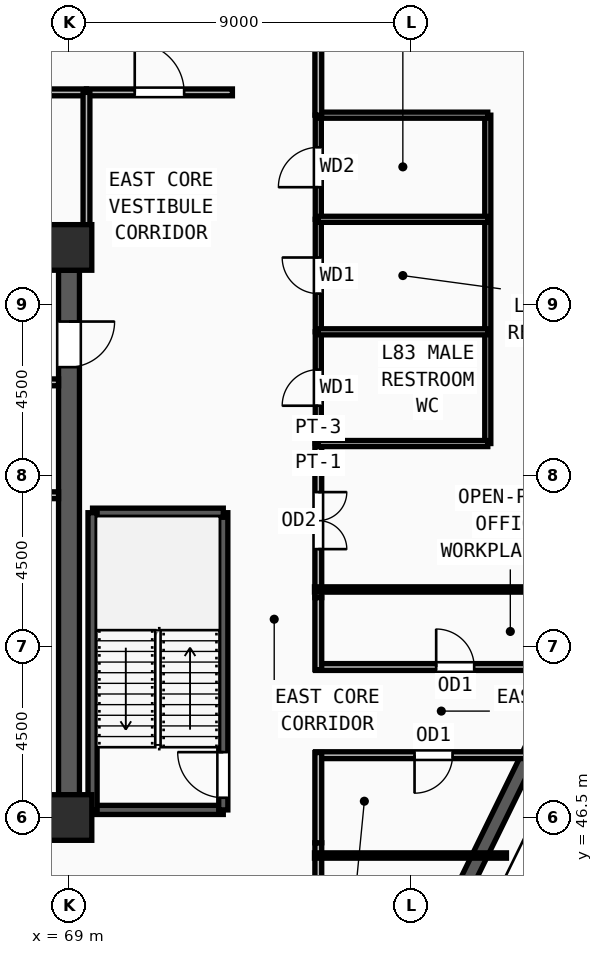
"""IFC4 building model, lengths in metres.
Left out: names, types, materials, properties, quantities, classifications, styles, units other than length and angle.
Written with IfcOpenShell. Run it as: python <this file> out.ifc"""

import sys

from ifc_helpers import new_model, si_unit, direction, frame, frame_2d, origin, origin_2d, place, context, subcontext, project, spatial, rectangle, extrude, source, transform, mapped, element, fill, save


model = new_model("IFC4")
c1 = context("Model", 3, precision=1e-05, world=origin(), true_north=direction((0.0, 1.0)))
c2 = subcontext(c1, "Body", "Model", "MODEL_VIEW")
j1 = project(units=[si_unit("LENGTHUNIT", "METRE"), si_unit("PLANEANGLEUNIT", "RADIAN")], contexts=[c1])
p1 = place(None, origin())
s1 = spatial("IfcSite", under=j1, at=p1, CompositionType="ELEMENT")
p2 = place(p1, origin())
s2 = spatial("IfcBuilding", under=s1, at=p2, CompositionType="ELEMENT")
p3 = place(p2, frame((0.0, 0.0, 320.25)))
s3 = spatial("IfcBuildingStorey", under=s2, at=p3, CompositionType="ELEMENT", Elevation=320.25)
m1 = source(origin(), c2, "Body", "SweptSolid", [
    extrude(rectangle(XDim=1.2, YDim=1.2, at=origin_2d()), origin(), (0.0, 0.0, 1.0), 3.75),
])
for number, where, z_axis, x_axis in (
    (1, (69.0, 46.5, 0.0), (0.0, 0.0, 1.0), (1.0, 0.0, 0.0)),
    (2, (69.0, 61.5, 0.0), (0.0, 0.0, 1.0), (1.0, 0.0, 0.0)),
):
    element("IfcColumn", number, at=place(p3, frame(where, z_axis=z_axis, x_axis=x_axis)), inside=s3, PredefinedType="COLUMN", context=c2, shape_type="MappedRepresentation", body=[
        mapped(m1, transform((0.0, 0.0, 0.0), x_axis=(1.0, 0.0, 0.0), y_axis=(0.0, 1.0, 0.0), z_axis=(0.0, 0.0, 1.0), scale=1.0)),
    ])
p4 = place(p3, frame((77.918, 41.639, 0.0), z_axis=(0.0, 0.0, 1.0), x_axis=(0.440053301327, 0.897971654336, 0.0)))
e3 = element("IfcWall", 3, at=p4, inside=s3, PredefinedType="SOLIDWALL", context=c2, shape_type="SweptSolid", body=[
    extrude(rectangle(XDim=26.074, YDim=0.38, at=frame_2d((13.037, 0.0))), origin(), (0.0, 0.0, 1.0), 3.47),
])
m2 = source(origin(), c2, "Body", "SweptSolid", [
    extrude(rectangle(XDim=1.35, YDim=1.85, at=frame_2d((0.675, 0.925))), frame((0.0, 0.2, 0.0), z_axis=(0.0, -1.0, 0.0), x_axis=(1.0, 0.0, 0.0)), (0.0, 0.0, 1.0), 0.4),
])
p5 = place(p4, frame((13.212, 0.0, 0.55)))
e4 = element("IfcOpeningElement", 4, at=p5, cuts=e3, PredefinedType="OPENING", context=c2, shape_type="MappedRepresentation", body=[
    mapped(m2, transform((0.0, 0.0, 0.0), x_axis=(1.0, 0.0, 0.0), y_axis=(0.0, 1.0, 0.0), z_axis=(0.0, 0.0, 1.0), scale=1.0)),
])
p6 = place(p4, frame((18.881, 0.0, 0.55)))
e5 = element("IfcOpeningElement", 5, at=p6, cuts=e3, PredefinedType="OPENING", context=c2, shape_type="MappedRepresentation", body=[
    mapped(m2, transform((0.0, 0.0, 0.0), x_axis=(1.0, 0.0, 0.0), y_axis=(0.0, 1.0, 0.0), z_axis=(0.0, 0.0, 1.0), scale=1.0)),
])
p7 = place(p3, frame((69.0, 60.9, 0.0), z_axis=(0.0, 0.0, 1.0), x_axis=(0.0, -1.0, 0.0)))
e6 = element("IfcWall", 6, at=p7, inside=s3, PredefinedType="SHEAR", context=c2, shape_type="SweptSolid", body=[
    extrude(rectangle(XDim=13.8, YDim=0.55, at=frame_2d((6.9, 0.0))), origin(), (0.0, 0.0, 1.0), 3.47),
])
m3 = source(origin(), c2, "Body", "SweptSolid", [
    extrude(rectangle(XDim=1.2, YDim=2.2, at=frame_2d((0.6, 1.1))), frame((0.0, 0.285, 0.0), z_axis=(0.0, -1.0, 0.0), x_axis=(1.0, 0.0, 0.0)), (0.0, 0.0, 1.0), 0.57),
])
p8 = place(p7, frame((1.35, 0.0, 0.0)))
e7 = element("IfcOpeningElement", 7, at=p8, cuts=e6, PredefinedType="OPENING", context=c2, shape_type="MappedRepresentation", body=[
    mapped(m3, transform((0.0, 0.0, 0.0), x_axis=(1.0, 0.0, 0.0), y_axis=(0.0, 1.0, 0.0), z_axis=(0.0, 0.0, 1.0), scale=1.0)),
])
p9 = place(p3, frame((69.62, 46.7, 0.0), z_axis=(0.0, 0.0, 1.0), x_axis=(1.0, 0.0, 0.0)))
e8 = element("IfcWall", 8, at=p9, inside=s3, PredefinedType="SOLIDWALL", context=c2, shape_type="SweptSolid", body=[
    extrude(rectangle(XDim=3.44, YDim=0.24, at=frame_2d((1.72, 0.0))), origin(), (0.0, 0.0, 1.0), 3.47),
])
p10 = place(p3, frame((73.06, 46.7, 0.0), z_axis=(0.0, 0.0, 1.0), x_axis=(0.0, 1.0, 0.0)))
e9 = element("IfcWall", 9, at=p10, inside=s3, PredefinedType="SOLIDWALL", context=c2, shape_type="SweptSolid", body=[
    extrude(rectangle(XDim=7.82, YDim=0.24, at=frame_2d((3.91, 0.0))), origin(), (0.0, 0.0, 1.0), 3.47),
])
m4 = source(origin(), c2, "Body", "SweptSolid", [
    extrude(rectangle(XDim=1.2, YDim=2.2, at=frame_2d((0.6, 1.1))), frame((0.0, 0.13, 0.0), z_axis=(0.0, -1.0, 0.0), x_axis=(1.0, 0.0, 0.0)), (0.0, 0.0, 1.0), 0.26),
])
p11 = place(p10, frame((0.32, 0.0, 0.0)))
e10 = element("IfcOpeningElement", 10, at=p11, cuts=e9, PredefinedType="OPENING", context=c2, shape_type="MappedRepresentation", body=[
    mapped(m4, transform((0.0, 0.0, 0.0), x_axis=(1.0, 0.0, 0.0), y_axis=(0.0, 1.0, 0.0), z_axis=(0.0, 0.0, 1.0), scale=1.0)),
])
p12 = place(p3, frame((73.06, 54.52, 0.0), z_axis=(0.0, 0.0, 1.0), x_axis=(-1.0, 0.0, 0.0)))
e11 = element("IfcWall", 11, at=p12, inside=s3, PredefinedType="SOLIDWALL", context=c2, shape_type="SweptSolid", body=[
    extrude(rectangle(XDim=3.44, YDim=0.24, at=frame_2d((1.72, 0.0))), origin(), (0.0, 0.0, 1.0), 3.47),
])
p13 = place(p3, frame((69.62, 54.52, 0.0), z_axis=(0.0, 0.0, 1.0), x_axis=(0.0, -1.0, 0.0)))
e12 = element("IfcWall", 12, at=p13, inside=s3, PredefinedType="SOLIDWALL", context=c2, shape_type="SweptSolid", body=[
    extrude(rectangle(XDim=7.82, YDim=0.24, at=frame_2d((3.91, 0.0))), origin(), (0.0, 0.0, 1.0), 3.47),
])
p14 = place(p3, frame((62.1, 54.98, 0.0), z_axis=(0.0, 0.0, 1.0), x_axis=(1.0, 0.0, 0.0)))
e13 = element("IfcWall", 13, at=p14, inside=s3, PredefinedType="PARTITIONING", context=c2, shape_type="SweptSolid", body=[
    extrude(rectangle(XDim=6.625, YDim=0.18, at=frame_2d((3.312, 0.0))), origin(), (0.0, 0.0, 1.0), 3.47),
])
m5 = source(origin(), c2, "Body", "SweptSolid", [
    extrude(rectangle(XDim=0.85, YDim=2.1, at=frame_2d((0.425, 1.05))), frame((0.0, 0.1, 0.0), z_axis=(0.0, -1.0, 0.0), x_axis=(1.0, 0.0, 0.0)), (0.0, 0.0, 1.0), 0.2),
])
p15 = place(p14, frame((2.8, 0.0, 0.0)))
e14 = element("IfcOpeningElement", 14, at=p15, cuts=e13, PredefinedType="OPENING", context=c2, shape_type="MappedRepresentation", body=[
    mapped(m5, transform((0.0, 0.0, 0.0), x_axis=(1.0, 0.0, 0.0), y_axis=(0.0, 1.0, 0.0), z_axis=(0.0, 0.0, 1.0), scale=1.0)),
])
p16 = place(p3, frame((75.56, 56.34, 0.0), z_axis=(0.0, 0.0, 1.0), x_axis=(0.0, 1.0, 0.0)))
e15 = element("IfcWall", 15, at=p16, inside=s3, PredefinedType="PARTITIONING", context=c2, shape_type="SweptSolid", body=[
    extrude(rectangle(XDim=2.94, YDim=0.16, at=frame_2d((1.47, 0.0))), origin(), (0.0, 0.0, 1.0), 3.47),
])
m6 = source(origin(), c2, "Body", "SweptSolid", [
    extrude(rectangle(XDim=0.95, YDim=2.15, at=frame_2d((0.475, 1.075))), frame((0.0, 0.09, 0.0), z_axis=(0.0, -1.0, 0.0), x_axis=(1.0, 0.0, 0.0)), (0.0, 0.0, 1.0), 0.18),
])
p17 = place(p16, frame((0.995, 0.0, 0.0)))
e16 = element("IfcOpeningElement", 16, at=p17, cuts=e15, PredefinedType="OPENING", context=c2, shape_type="MappedRepresentation", body=[
    mapped(m6, transform((0.0, 0.0, 0.0), x_axis=(1.0, 0.0, 0.0), y_axis=(0.0, 1.0, 0.0), z_axis=(0.0, 0.0, 1.0), scale=1.0)),
])
p18 = place(p3, frame((75.56, 59.28, 0.0), z_axis=(0.0, 0.0, 1.0), x_axis=(0.0, 1.0, 0.0)))
e17 = element("IfcWall", 17, at=p18, inside=s3, PredefinedType="PARTITIONING", context=c2, shape_type="SweptSolid", body=[
    extrude(rectangle(XDim=2.96, YDim=0.16, at=frame_2d((1.48, 0.0))), origin(), (0.0, 0.0, 1.0), 3.47),
])
p19 = place(p18, frame((1.005, 0.0, 0.0)))
e18 = element("IfcOpeningElement", 18, at=p19, cuts=e17, PredefinedType="OPENING", context=c2, shape_type="MappedRepresentation", body=[
    mapped(m6, transform((0.0, 0.0, 0.0), x_axis=(1.0, 0.0, 0.0), y_axis=(0.0, 1.0, 0.0), z_axis=(0.0, 0.0, 1.0), scale=1.0)),
])
p20 = place(p3, frame((75.56, 62.24, 0.0), z_axis=(0.0, 0.0, 1.0), x_axis=(0.0, 1.0, 0.0)))
e19 = element("IfcWall", 19, at=p20, inside=s3, PredefinedType="PARTITIONING", context=c2, shape_type="SweptSolid", body=[
    extrude(rectangle(XDim=2.74, YDim=0.16, at=frame_2d((1.37, 0.0))), origin(), (0.0, 0.0, 1.0), 3.47),
])
m7 = source(origin(), c2, "Body", "SweptSolid", [
    extrude(rectangle(XDim=1.05, YDim=2.15, at=frame_2d((0.525, 1.075))), frame((0.0, 0.09, 0.0), z_axis=(0.0, -1.0, 0.0), x_axis=(1.0, 0.0, 0.0)), (0.0, 0.0, 1.0), 0.18),
])
p21 = place(p20, frame((0.845, 0.0, 0.0)))
e20 = element("IfcOpeningElement", 20, at=p21, cuts=e19, PredefinedType="OPENING", context=c2, shape_type="MappedRepresentation", body=[
    mapped(m7, transform((0.0, 0.0, 0.0), x_axis=(1.0, 0.0, 0.0), y_axis=(0.0, 1.0, 0.0), z_axis=(0.0, 0.0, 1.0), scale=1.0)),
])
p22 = place(p3, frame((62.39, 65.58, 0.0), z_axis=(0.0, 0.0, 1.0), x_axis=(1.0, 0.0, 0.0)))
e21 = element("IfcWall", 21, at=p22, inside=s3, PredefinedType="PARTITIONING", context=c2, shape_type="SweptSolid", body=[
    extrude(rectangle(XDim=7.07, YDim=0.18, at=frame_2d((3.535, 0.0))), origin(), (0.0, 0.0, 1.0), 3.47),
])
m8 = source(origin(), c2, "Body", "SweptSolid", [
    extrude(rectangle(XDim=1.0, YDim=2.2, at=frame_2d((0.5, 1.1))), frame((0.0, 0.1, 0.0), z_axis=(0.0, -1.0, 0.0), x_axis=(1.0, 0.0, 0.0)), (0.0, 0.0, 1.0), 0.2),
])
p23 = place(p22, frame((3.035, 0.0, 0.0)))
e22 = element("IfcOpeningElement", 22, at=p23, cuts=e21, PredefinedType="OPENING", context=c2, shape_type="MappedRepresentation", body=[
    mapped(m8, transform((0.0, 0.0, 0.0), x_axis=(1.0, 0.0, 0.0), y_axis=(0.0, 1.0, 0.0), z_axis=(0.0, 0.0, 1.0), scale=1.0)),
])
p24 = place(p3, frame((69.46, 65.58, 0.0), z_axis=(0.0, 0.0, 1.0), x_axis=(1.0, 0.0, 0.0)))
e23 = element("IfcWall", 23, at=p24, inside=s3, PredefinedType="PARTITIONING", context=c2, shape_type="SweptSolid", body=[
    extrude(rectangle(XDim=3.84, YDim=0.18, at=frame_2d((1.92, 0.0))), origin(), (0.0, 0.0, 1.0), 3.47),
])
m9 = source(origin(), c2, "Body", "SweptSolid", [
    extrude(rectangle(XDim=1.3, YDim=2.2, at=frame_2d((0.65, 1.1))), frame((0.0, 0.1, 0.0), z_axis=(0.0, -1.0, 0.0), x_axis=(1.0, 0.0, 0.0)), (0.0, 0.0, 1.0), 0.2),
])
p25 = place(p24, frame((1.27, 0.0, 0.0)))
e24 = element("IfcOpeningElement", 24, at=p25, cuts=e23, PredefinedType="OPENING", context=c2, shape_type="MappedRepresentation", body=[
    mapped(m9, transform((0.0, 0.0, 0.0), x_axis=(1.0, 0.0, 0.0), y_axis=(0.0, 1.0, 0.0), z_axis=(0.0, 0.0, 1.0), scale=1.0)),
])
p26 = place(p3, frame((75.56, 56.34, 0.0), z_axis=(0.0, 0.0, 1.0), x_axis=(0.0, -1.0, 0.0)))
e25 = element("IfcWall", 25, at=p26, inside=s3, PredefinedType="PARTITIONING", context=c2, shape_type="SweptSolid", body=[
    extrude(rectangle(XDim=4.055, YDim=0.18, at=frame_2d((2.028, 0.0))), origin(), (0.0, 0.0, 1.0), 3.47),
])
m10 = source(origin(), c2, "Body", "SweptSolid", [
    extrude(rectangle(XDim=1.5, YDim=2.2, at=frame_2d((0.75, 1.1))), frame((0.0, 0.1, 0.0), z_axis=(0.0, -1.0, 0.0), x_axis=(1.0, 0.0, 0.0)), (0.0, 0.0, 1.0), 0.2),
])
p27 = place(p26, frame((1.278, 0.0, 0.0)))
e26 = element("IfcOpeningElement", 26, at=p27, cuts=e25, PredefinedType="OPENING", context=c2, shape_type="MappedRepresentation", body=[
    mapped(m10, transform((0.0, 0.0, 0.0), x_axis=(1.0, 0.0, 0.0), y_axis=(0.0, 1.0, 0.0), z_axis=(0.0, 0.0, 1.0), scale=1.0)),
])
p28 = place(p3, frame((81.697, 48.14, 0.0), z_axis=(0.0, 0.0, 1.0), x_axis=(-1.0, 0.0, 0.0)))
e27 = element("IfcWall", 27, at=p28, inside=s3, PredefinedType="PARTITIONING", context=c2, shape_type="SweptSolid", body=[
    extrude(rectangle(XDim=6.207, YDim=0.18, at=frame_2d((3.104, 0.0))), origin(), (0.0, 0.0, 1.0), 3.47),
])
p29 = place(p28, frame((2.604, 0.0, 0.0)))
e28 = element("IfcOpeningElement", 28, at=p29, cuts=e27, PredefinedType="OPENING", context=c2, shape_type="MappedRepresentation", body=[
    mapped(m8, transform((0.0, 0.0, 0.0), x_axis=(1.0, 0.0, 0.0), y_axis=(0.0, 1.0, 0.0), z_axis=(0.0, 0.0, 1.0), scale=1.0)),
])
p30 = place(p3, frame((75.49, 50.46, 0.0), z_axis=(0.0, 0.0, 1.0), x_axis=(1.0, 0.0, 0.0)))
e29 = element("IfcWall", 29, at=p30, inside=s3, PredefinedType="PARTITIONING", context=c2, shape_type="SweptSolid", body=[
    extrude(rectangle(XDim=7.344, YDim=0.18, at=frame_2d((3.672, 0.0))), origin(), (0.0, 0.0, 1.0), 3.47),
])
p31 = place(p30, frame((3.172, 0.0, 0.0)))
e30 = element("IfcOpeningElement", 30, at=p31, cuts=e29, PredefinedType="OPENING", context=c2, shape_type="MappedRepresentation", body=[
    mapped(m8, transform((0.0, 0.0, 0.0), x_axis=(1.0, 0.0, 0.0), y_axis=(0.0, 1.0, 0.0), z_axis=(0.0, 0.0, 1.0), scale=1.0)),
])
p32 = place(p3, frame((80.02, 56.34, 0.0), z_axis=(0.0, 0.0, 1.0), x_axis=(0.0, 1.0, 0.0)))
e31 = element("IfcWall", 31, at=p32, inside=s3, PredefinedType="PARTITIONING", context=c2, shape_type="SweptSolid", body=[
    extrude(rectangle(XDim=8.64, YDim=0.16, at=frame_2d((4.32, 0.0))), origin(), (0.0, 0.0, 1.0), 3.47),
])
for number, where, z_axis, x_axis in (
    (32, (75.56, 56.34, 0.0), (0.0, 0.0, 1.0), (1.0, 0.0, 0.0)),
    (33, (75.56, 59.28, 0.0), (0.0, 0.0, 1.0), (1.0, 0.0, 0.0)),
    (34, (75.56, 62.24, 0.0), (0.0, 0.0, 1.0), (1.0, 0.0, 0.0)),
    (35, (75.56, 64.98, 0.0), (0.0, 0.0, 1.0), (1.0, 0.0, 0.0)),
):
    element("IfcWall", number, at=place(p3, frame(where, z_axis=z_axis, x_axis=x_axis)), inside=s3, PredefinedType="PARTITIONING", context=c2, shape_type="SweptSolid", body=[
        extrude(rectangle(XDim=4.46, YDim=0.16, at=frame_2d((2.23, 0.0))), origin(), (0.0, 0.0, 1.0), 3.47),
    ])
p33 = place(p3, frame((69.46, 61.95, 0.0), z_axis=(0.0, 0.0, 1.0), x_axis=(0.0, 1.0, 0.0)))
e36 = element("IfcWall", 36, at=p33, inside=s3, PredefinedType="PARTITIONING", context=c2, shape_type="SweptSolid", body=[
    extrude(rectangle(XDim=3.63, YDim=0.18, at=frame_2d((1.815, 0.0))), origin(), (0.0, 0.0, 1.0), 3.47),
])
p34 = place(p3, frame((75.56, 67.215, 0.0), z_axis=(0.0, 0.0, 1.0), x_axis=(0.0, -1.0, 0.0)))
e37 = element("IfcWall", 37, at=p34, inside=s3, PredefinedType="PARTITIONING", context=c2, shape_type="SweptSolid", body=[
    extrude(rectangle(XDim=2.235, YDim=0.18, at=frame_2d((1.118, 0.0))), origin(), (0.0, 0.0, 1.0), 3.47),
])
p35 = place(p3, frame((75.56, 45.835, 0.0), z_axis=(0.0, 0.0, 1.0), x_axis=(0.0, -1.0, 0.0)))
e38 = element("IfcWall", 38, at=p35, inside=s3, PredefinedType="PARTITIONING", context=c2, shape_type="SweptSolid", body=[
    extrude(rectangle(XDim=2.165, YDim=0.18, at=frame_2d((1.083, 0.0))), origin(), (0.0, 0.0, 1.0), 3.47),
])
p36 = place(p3, frame((75.56, 48.21, 0.0), z_axis=(0.0, 0.0, 1.0), x_axis=(0.0, -1.0, 0.0)))
e39 = element("IfcWall", 39, at=p36, inside=s3, PredefinedType="PARTITIONING", context=c2, shape_type="SweptSolid", body=[
    extrude(rectangle(XDim=2.375, YDim=0.18, at=frame_2d((1.188, 0.0))), origin(), (0.0, 0.0, 1.0), 3.47),
])
p37 = place(p3, frame((75.56, 52.285, 0.0), z_axis=(0.0, 0.0, 1.0), x_axis=(0.0, -1.0, 0.0)))
e40 = element("IfcWall", 40, at=p37, inside=s3, PredefinedType="PARTITIONING", context=c2, shape_type="SweptSolid", body=[
    extrude(rectangle(XDim=1.895, YDim=0.18, at=frame_2d((0.948, 0.0))), origin(), (0.0, 0.0, 1.0), 3.47),
])
p38 = place(p3, frame((75.46, 45.5, 0.0), z_axis=(0.0, 0.0, 1.0), x_axis=(1.0, 0.0, 0.0)))
e41 = element("IfcWall", 41, at=p38, inside=s3, PredefinedType="PARTITIONING", context=c2, shape_type="SweptSolid", body=[
    extrude(rectangle(XDim=5.051, YDim=0.14, at=frame_2d((2.525, 0.0))), origin(), (0.0, 0.0, 1.0), 3.47),
])
p39 = place(p3, frame((75.46, 52.5, 0.0), z_axis=(0.0, 0.0, 1.0), x_axis=(1.0, 0.0, 0.0)))
e42 = element("IfcWall", 42, at=p39, inside=s3, PredefinedType="PARTITIONING", context=c2, shape_type="SweptSolid", body=[
    extrude(rectangle(XDim=8.482, YDim=0.14, at=frame_2d((4.241, 0.0))), origin(), (0.0, 0.0, 1.0), 3.47),
])
p40 = place(p3, frame((67.4, 57.95, 0.0), z_axis=(0.0, 0.0, 1.0), x_axis=(1.0, 0.0, 0.0)))
e43 = element("IfcWall", 43, at=p40, inside=s3, PredefinedType="PARTITIONING", context=c2, shape_type="SweptSolid", body=[
    extrude(rectangle(XDim=1.325, YDim=0.18, at=frame_2d((0.663, 0.0))), origin(), (0.0, 0.0, 1.0), 3.47),
])
m11 = source(origin(), c2, "Body", "SweptSolid", [
    extrude(rectangle(XDim=1.2, YDim=2.2, at=frame_2d((0.6, 1.1))), frame((0.0, 0.025, 0.0), z_axis=(0.0, -1.0, 0.0), x_axis=(1.0, 0.0, 0.0)), (0.0, 0.0, 1.0), 0.05),
])
p41 = place(p8, origin())
e44 = element("IfcDoor", 44, at=p41, inside=s3, OperationType="SINGLE_SWING_LEFT", PredefinedType="DOOR", context=c2, shape_type="MappedRepresentation", body=[
    mapped(m11, transform((0.0, 0.0, 0.0), x_axis=(1.0, 0.0, 0.0), y_axis=(0.0, 1.0, 0.0), z_axis=(0.0, 0.0, 1.0), scale=1.0)),
])
fill(e7, e44)
p42 = place(p11, origin())
e45 = element("IfcDoor", 45, at=p42, inside=s3, OperationType="SINGLE_SWING_RIGHT", PredefinedType="DOOR", context=c2, shape_type="MappedRepresentation", body=[
    mapped(m11, transform((0.0, 0.0, 0.0), x_axis=(1.0, 0.0, 0.0), y_axis=(0.0, 1.0, 0.0), z_axis=(0.0, 0.0, 1.0), scale=1.0)),
])
fill(e10, e45)
m12 = source(origin(), c2, "Body", "SweptSolid", [
    extrude(rectangle(XDim=0.95, YDim=2.15, at=frame_2d((0.475, 1.075))), frame((0.0, 0.025, 0.0), z_axis=(0.0, -1.0, 0.0), x_axis=(1.0, 0.0, 0.0)), (0.0, 0.0, 1.0), 0.05),
])
p43 = place(p17, origin())
e46 = element("IfcDoor", 46, at=p43, inside=s3, OperationType="SINGLE_SWING_LEFT", PredefinedType="DOOR", context=c2, shape_type="MappedRepresentation", body=[
    mapped(m12, transform((0.0, 0.0, 0.0), x_axis=(1.0, 0.0, 0.0), y_axis=(0.0, 1.0, 0.0), z_axis=(0.0, 0.0, 1.0), scale=1.0)),
])
fill(e16, e46)
p44 = place(p19, origin())
e47 = element("IfcDoor", 47, at=p44, inside=s3, OperationType="SINGLE_SWING_RIGHT", PredefinedType="DOOR", context=c2, shape_type="MappedRepresentation", body=[
    mapped(m12, transform((0.0, 0.0, 0.0), x_axis=(1.0, 0.0, 0.0), y_axis=(0.0, 1.0, 0.0), z_axis=(0.0, 0.0, 1.0), scale=1.0)),
])
fill(e18, e47)
m13 = source(origin(), c2, "Body", "SweptSolid", [
    extrude(rectangle(XDim=1.05, YDim=2.15, at=frame_2d((0.525, 1.075))), frame((0.0, 0.025, 0.0), z_axis=(0.0, -1.0, 0.0), x_axis=(1.0, 0.0, 0.0)), (0.0, 0.0, 1.0), 0.05),
])
p45 = place(p21, origin())
e48 = element("IfcDoor", 48, at=p45, inside=s3, OperationType="SINGLE_SWING_LEFT", PredefinedType="DOOR", context=c2, shape_type="MappedRepresentation", body=[
    mapped(m13, transform((0.0, 0.0, 0.0), x_axis=(1.0, 0.0, 0.0), y_axis=(0.0, 1.0, 0.0), z_axis=(0.0, 0.0, 1.0), scale=1.0)),
])
fill(e20, e48)
m14 = source(origin(), c2, "Body", "SweptSolid", [
    extrude(rectangle(XDim=1.3, YDim=2.2, at=frame_2d((0.65, 1.1))), frame((0.0, 0.025, 0.0), z_axis=(0.0, -1.0, 0.0), x_axis=(1.0, 0.0, 0.0)), (0.0, 0.0, 1.0), 0.05),
])
p46 = place(p25, origin())
e49 = element("IfcDoor", 49, at=p46, inside=s3, OperationType="SINGLE_SWING_LEFT", PredefinedType="DOOR", context=c2, shape_type="MappedRepresentation", body=[
    mapped(m14, transform((0.0, 0.0, 0.0), x_axis=(1.0, 0.0, 0.0), y_axis=(0.0, 1.0, 0.0), z_axis=(0.0, 0.0, 1.0), scale=1.0)),
])
fill(e24, e49)
m15 = source(origin(), c2, "Body", "SweptSolid", [
    extrude(rectangle(XDim=1.5, YDim=2.2, at=frame_2d((0.75, 1.1))), frame((0.0, 0.025, 0.0), z_axis=(0.0, -1.0, 0.0), x_axis=(1.0, 0.0, 0.0)), (0.0, 0.0, 1.0), 0.05),
])
p47 = place(p27, origin())
e50 = element("IfcDoor", 50, at=p47, inside=s3, OperationType="DOUBLE_DOOR_SINGLE_SWING", PredefinedType="DOOR", context=c2, shape_type="MappedRepresentation", body=[
    mapped(m15, transform((0.0, 0.0, 0.0), x_axis=(1.0, 0.0, 0.0), y_axis=(0.0, 1.0, 0.0), z_axis=(0.0, 0.0, 1.0), scale=1.0)),
])
fill(e26, e50)
m16 = source(origin(), c2, "Body", "SweptSolid", [
    extrude(rectangle(XDim=1.0, YDim=2.2, at=frame_2d((0.5, 1.1))), frame((0.0, 0.025, 0.0), z_axis=(0.0, -1.0, 0.0), x_axis=(1.0, 0.0, 0.0)), (0.0, 0.0, 1.0), 0.05),
])
p48 = place(p29, origin())
e51 = element("IfcDoor", 51, at=p48, inside=s3, OperationType="SINGLE_SWING_RIGHT", PredefinedType="DOOR", context=c2, shape_type="MappedRepresentation", body=[
    mapped(m16, transform((0.0, 0.0, 0.0), x_axis=(1.0, 0.0, 0.0), y_axis=(0.0, 1.0, 0.0), z_axis=(0.0, 0.0, 1.0), scale=1.0)),
])
fill(e28, e51)
p49 = place(p31, origin())
e52 = element("IfcDoor", 52, at=p49, inside=s3, OperationType="SINGLE_SWING_LEFT", PredefinedType="DOOR", context=c2, shape_type="MappedRepresentation", body=[
    mapped(m16, transform((0.0, 0.0, 0.0), x_axis=(1.0, 0.0, 0.0), y_axis=(0.0, 1.0, 0.0), z_axis=(0.0, 0.0, 1.0), scale=1.0)),
])
fill(e30, e52)
save(model, sys.argv[1])
